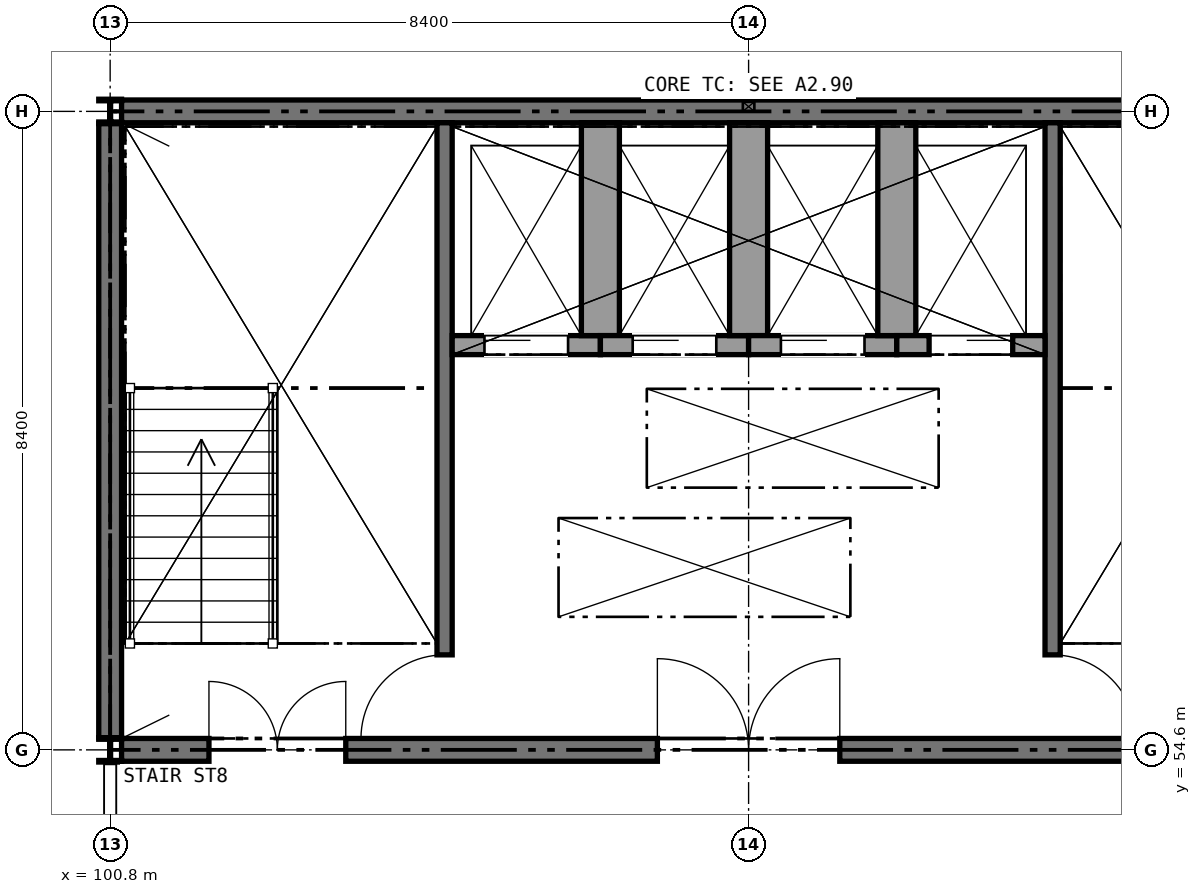
"""IFC4 building model, lengths in metres.
Left out: names, types, materials, properties, quantities, classifications, styles, units other than length and angle.
Written with IfcOpenShell. Run it as: python <this file> out.ifc"""

import sys

from ifc_helpers import new_model, si_unit, direction, frame, frame_2d, origin, origin_2d, place, context, subcontext, project, spatial, rectangle, hollow_rectangle, i_section, extrude, element, fill, save


model = new_model("IFC4")
c1 = context("Model", 3, precision=1e-05, world=origin(), true_north=direction((0.0, 1.0)))
c2 = subcontext(c1, "Body", "Model", "MODEL_VIEW")
j1 = project(units=[si_unit("LENGTHUNIT", "METRE"), si_unit("PLANEANGLEUNIT", "RADIAN")], contexts=[c1])
p1 = place(None, origin())
s1 = spatial("IfcSite", under=j1, at=p1, CompositionType="ELEMENT")
p2 = place(p1, origin())
s2 = spatial("IfcBuilding", under=s1, at=p2, CompositionType="ELEMENT")
p3 = place(p2, frame((0.0, 0.0, 67.6)))
s3 = spatial("IfcBuildingStorey", under=s2, at=p3, CompositionType="ELEMENT", Elevation=67.6)
p4 = place(p3, frame((100.95, 63.0, 0.0), z_axis=(0.0, 0.0, 1.0), x_axis=(1.0, 0.0, 0.0)))
e1 = element("IfcWall", 1, at=p4, inside=s3, PredefinedType="SHEAR", context=c2, shape_type="SweptSolid", body=[
    extrude(rectangle(XDim=16.49, YDim=0.3, at=frame_2d((8.245, 0.0))), origin(), (0.0, 0.0, 1.0), 4.2),
])
p5 = place(p3, frame((100.95, 54.6, 0.0), z_axis=(0.0, 0.0, 1.0), x_axis=(1.0, 0.0, 0.0)))
e2 = element("IfcWall", 2, at=p5, inside=s3, PredefinedType="SHEAR", context=c2, shape_type="SweptSolid", body=[
    extrude(rectangle(XDim=16.49, YDim=0.3, at=frame_2d((8.245, 0.0))), origin(), (0.0, 0.0, 1.0), 4.2),
])
p6 = place(p5, frame((1.15, 0.0, 0.0)))
e3 = element("IfcOpeningElement", 3, at=p6, cuts=e2, PredefinedType="OPENING", context=c2, shape_type="SweptSolid", body=[
    extrude(rectangle(XDim=1.8, YDim=2.1, at=frame_2d((0.9, 1.05))), frame((0.0, 0.16, 0.0), z_axis=(0.0, -1.0, 0.0), x_axis=(1.0, 0.0, 0.0)), (0.0, 0.0, 1.0), 0.32),
])
p7 = place(p5, frame((13.55, 0.0, 0.0)))
e4 = element("IfcOpeningElement", 4, at=p7, cuts=e2, PredefinedType="OPENING", context=c2, shape_type="SweptSolid", body=[
    extrude(rectangle(XDim=1.8, YDim=2.1, at=frame_2d((0.9, 1.05))), frame((0.0, 0.16, 0.0), z_axis=(0.0, -1.0, 0.0), x_axis=(1.0, 0.0, 0.0)), (0.0, 0.0, 1.0), 0.32),
])
p8 = place(p5, frame((7.05, 0.0, 0.0)))
e5 = element("IfcOpeningElement", 5, at=p8, cuts=e2, PredefinedType="OPENING", context=c2, shape_type="SweptSolid", body=[
    extrude(rectangle(XDim=2.4, YDim=2.4, at=frame_2d((1.2, 1.2))), frame((0.0, 0.16, 0.0), z_axis=(0.0, -1.0, 0.0), x_axis=(1.0, 0.0, 0.0)), (0.0, 0.0, 1.0), 0.32),
])
p9 = place(p3, frame((100.8, 54.76, 0.0), z_axis=(0.0, 0.0, 1.0), x_axis=(0.0, 1.0, 0.0)))
e6 = element("IfcWall", 6, at=p9, inside=s3, PredefinedType="SHEAR", context=c2, shape_type="SweptSolid", body=[
    extrude(rectangle(XDim=8.08, YDim=0.3, at=frame_2d((4.04, 0.0))), origin(), (0.0, 0.0, 1.0), 4.2),
])
for number, where, z_axis, x_axis in (
    (7, (100.8, 54.6, 0.0), (0.0, 0.0, 1.0), (1.0, 0.0, 0.0)),
    (8, (100.8, 63.0, 0.0), (0.0, 0.0, 1.0), (1.0, 0.0, 0.0)),
):
    element("IfcColumn", number, at=place(p3, frame(where, z_axis=z_axis, x_axis=x_axis)), inside=s3, PredefinedType="COLUMN", context=c2, shape_type="SweptSolid", body=[
        extrude(i_section(OverallWidth=0.3, OverallDepth=0.32, WebThickness=0.011, FlangeThickness=0.021, FilletRadius=0.027, at=origin_2d()), origin(), (0.0, 0.0, 1.0), 4.4),
    ])
p10 = place(p3, frame((100.8, 54.6, 4.4), z_axis=(0.0, 0.0, 1.0), x_axis=(1.0, 0.0, 0.0)))
e9 = element("IfcColumn", 9, at=p10, inside=s3, PredefinedType="COLUMN", context=c2, shape_type="SweptSolid", body=[
    extrude(hollow_rectangle(XDim=0.15, YDim=0.25, WallThickness=0.01, at=origin_2d()), origin(), (0.0, 0.0, 1.0), 3.0),
])
p11 = place(p3, frame((109.2, 54.6, 4.2), z_axis=(0.0, 0.0, 1.0), x_axis=(1.0, 0.0, 0.0)))
e10 = element("IfcColumn", 10, at=p11, inside=s3, PredefinedType="COLUMN", context=c2, shape_type="SweptSolid", body=[
    extrude(hollow_rectangle(XDim=0.15, YDim=0.25, WallThickness=0.01, at=origin_2d()), origin(), (0.0, 0.0, 1.0), 3.2),
])
p12 = place(p3, frame((100.8, 63.0, 4.4), z_axis=(0.0, 0.0, 1.0), x_axis=(1.0, 0.0, 0.0)))
e11 = element("IfcColumn", 11, at=p12, inside=s3, PredefinedType="COLUMN", context=c2, shape_type="SweptSolid", body=[
    extrude(hollow_rectangle(XDim=0.15, YDim=0.25, WallThickness=0.01, at=origin_2d()), origin(), (0.0, 0.0, 1.0), 3.0),
])
p13 = place(p3, frame((109.2, 63.0, 4.2), z_axis=(0.0, 0.0, 1.0), x_axis=(1.0, 0.0, 0.0)))
e12 = element("IfcColumn", 12, at=p13, inside=s3, PredefinedType="COLUMN", context=c2, shape_type="SweptSolid", body=[
    extrude(hollow_rectangle(XDim=0.15, YDim=0.25, WallThickness=0.01, at=origin_2d()), origin(), (0.0, 0.0, 1.0), 3.2),
])
p14 = place(p3, frame((100.8, 54.6, 4.4), z_axis=(0.0, 0.0, 1.0), x_axis=(0.0, 1.0, 0.0)))
e13 = element("IfcWall", 13, at=p14, inside=s3, PredefinedType="STANDARD", context=c2, shape_type="SweptSolid", body=[
    extrude(rectangle(XDim=8.4, YDim=0.3, at=frame_2d((4.2, 0.0))), origin(), (0.0, 0.0, 1.0), 3.0),
])
p15 = place(p3, frame((100.95, 54.6, 4.4), z_axis=(0.0, 0.0, 1.0), x_axis=(1.0, 0.0, 0.0)))
e14 = element("IfcWall", 14, at=p15, inside=s3, PredefinedType="STANDARD", context=c2, shape_type="SweptSolid", body=[
    extrude(rectangle(XDim=8.175, YDim=0.3, at=frame_2d((4.088, 0.0))), origin(), (0.0, 0.0, 1.0), 2.5),
])
p16 = place(p15, frame((1.5, 0.0, 0.0)))
e15 = element("IfcOpeningElement", 15, at=p16, cuts=e14, PredefinedType="OPENING", context=c2, shape_type="SweptSolid", body=[
    extrude(rectangle(XDim=1.1, YDim=2.1, at=frame_2d((0.55, 1.05))), frame((0.0, 0.16, 0.0), z_axis=(0.0, -1.0, 0.0), x_axis=(1.0, 0.0, 0.0)), (0.0, 0.0, 1.0), 0.32),
])
p17 = place(p15, frame((5.55, 0.0, 0.0)))
e16 = element("IfcOpeningElement", 16, at=p17, cuts=e14, PredefinedType="OPENING", context=c2, shape_type="SweptSolid", body=[
    extrude(rectangle(XDim=1.8, YDim=2.4, at=frame_2d((0.9, 1.2))), frame((0.0, 0.16, 0.0), z_axis=(0.0, -1.0, 0.0), x_axis=(1.0, 0.0, 0.0)), (0.0, 0.0, 1.0), 0.32),
])
p18 = place(p3, frame((109.275, 54.6, 4.4), z_axis=(0.0, 0.0, 1.0), x_axis=(1.0, 0.0, 0.0)))
e17 = element("IfcWall", 17, at=p18, inside=s3, PredefinedType="STANDARD", context=c2, shape_type="SweptSolid", body=[
    extrude(rectangle(XDim=8.175, YDim=0.3, at=frame_2d((4.087, 0.0))), origin(), (0.0, 0.0, 1.0), 2.5),
])
p19 = place(p18, frame((5.575, 0.0, 0.0)))
e18 = element("IfcOpeningElement", 18, at=p19, cuts=e17, PredefinedType="OPENING", context=c2, shape_type="SweptSolid", body=[
    extrude(rectangle(XDim=1.1, YDim=2.1, at=frame_2d((0.55, 1.05))), frame((0.0, 0.16, 0.0), z_axis=(0.0, -1.0, 0.0), x_axis=(1.0, 0.0, 0.0)), (0.0, 0.0, 1.0), 0.32),
])
p20 = place(p18, frame((0.825, 0.0, 0.0)))
e19 = element("IfcOpeningElement", 19, at=p20, cuts=e17, PredefinedType="OPENING", context=c2, shape_type="SweptSolid", body=[
    extrude(rectangle(XDim=1.8, YDim=2.4, at=frame_2d((0.9, 1.2))), frame((0.0, 0.16, 0.0), z_axis=(0.0, -1.0, 0.0), x_axis=(1.0, 0.0, 0.0)), (0.0, 0.0, 1.0), 0.32),
])
p21 = place(p3, frame((100.95, 63.0, 4.4), z_axis=(0.0, 0.0, 1.0), x_axis=(1.0, 0.0, 0.0)))
e20 = element("IfcWall", 20, at=p21, inside=s3, PredefinedType="STANDARD", context=c2, shape_type="SweptSolid", body=[
    extrude(rectangle(XDim=8.175, YDim=0.3, at=frame_2d((4.088, 0.0))), origin(), (0.0, 0.0, 1.0), 2.5),
])
p22 = place(p3, frame((109.275, 63.0, 4.4), z_axis=(0.0, 0.0, 1.0), x_axis=(1.0, 0.0, 0.0)))
e21 = element("IfcWall", 21, at=p22, inside=s3, PredefinedType="STANDARD", context=c2, shape_type="SweptSolid", body=[
    extrude(rectangle(XDim=8.175, YDim=0.3, at=frame_2d((4.087, 0.0))), origin(), (0.0, 0.0, 1.0), 2.5),
])
p23 = place(p3, frame((105.2, 62.85, 0.0), z_axis=(0.0, 0.0, 1.0), x_axis=(0.0, -1.0, 0.0)))
e22 = element("IfcWall", 22, at=p23, inside=s3, PredefinedType="SHEAR", context=c2, shape_type="SweptSolid", body=[
    extrude(rectangle(XDim=8.1, YDim=0.2, at=frame_2d((4.05, 0.0))), origin(), (0.0, 0.0, 1.0), 4.2),
])
p24 = place(p23, frame((7.0, 0.0, 0.0)))
e23 = element("IfcOpeningElement", 23, at=p24, cuts=e22, PredefinedType="OPENING", context=c2, shape_type="SweptSolid", body=[
    extrude(rectangle(XDim=1.11, YDim=2.1, at=frame_2d((0.555, 1.05))), frame((0.0, 0.11, 0.0), z_axis=(0.0, -1.0, 0.0), x_axis=(1.0, 0.0, 0.0)), (0.0, 0.0, 1.0), 0.22),
])
p25 = place(p3, frame((113.2, 62.85, 0.0), z_axis=(0.0, 0.0, 1.0), x_axis=(0.0, -1.0, 0.0)))
e24 = element("IfcWall", 24, at=p25, inside=s3, PredefinedType="SHEAR", context=c2, shape_type="SweptSolid", body=[
    extrude(rectangle(XDim=8.1, YDim=0.2, at=frame_2d((4.05, 0.0))), origin(), (0.0, 0.0, 1.0), 4.2),
])
p26 = place(p25, frame((7.0, 0.0, 0.0)))
e25 = element("IfcOpeningElement", 25, at=p26, cuts=e24, PredefinedType="OPENING", context=c2, shape_type="SweptSolid", body=[
    extrude(rectangle(XDim=1.11, YDim=2.1, at=frame_2d((0.555, 1.05))), frame((0.0, 0.11, 0.0), z_axis=(0.0, -1.0, 0.0), x_axis=(1.0, 0.0, 0.0)), (0.0, 0.0, 1.0), 0.22),
])
p27 = place(p3, frame((105.3, 59.925, 0.0), z_axis=(0.0, 0.0, 1.0), x_axis=(1.0, 0.0, 0.0)))
e26 = element("IfcWall", 26, at=p27, inside=s3, PredefinedType="SOLIDWALL", context=c2, shape_type="SweptSolid", body=[
    extrude(rectangle(XDim=1.95, YDim=0.25, at=frame_2d((0.975, 0.0))), origin(), (0.0, 0.0, 1.0), 7.4),
])
p28 = place(p27, frame((0.425, 0.0, 0.0)))
e27 = element("IfcOpeningElement", 27, at=p28, cuts=e26, PredefinedType="OPENING", context=c2, shape_type="SweptSolid", body=[
    extrude(rectangle(XDim=1.1, YDim=2.1, at=frame_2d((0.55, 1.05))), frame((0.0, 0.135, 0.0), z_axis=(0.0, -1.0, 0.0), x_axis=(1.0, 0.0, 0.0)), (0.0, 0.0, 1.0), 0.27),
])
p29 = place(p3, frame((107.25, 62.85, 0.0), z_axis=(0.0, 0.0, 1.0), x_axis=(0.0, -1.0, 0.0)))
e28 = element("IfcWall", 28, at=p29, inside=s3, PredefinedType="SOLIDWALL", context=c2, shape_type="SweptSolid", body=[
    extrude(rectangle(XDim=2.8, YDim=0.5, at=frame_2d((1.4, 0.0))), origin(), (0.0, 0.0, 1.0), 7.4),
])
p30 = place(p3, frame((107.25, 59.925, 0.0), z_axis=(0.0, 0.0, 1.0), x_axis=(1.0, 0.0, 0.0)))
e29 = element("IfcWall", 29, at=p30, inside=s3, PredefinedType="SOLIDWALL", context=c2, shape_type="SweptSolid", body=[
    extrude(rectangle(XDim=1.95, YDim=0.25, at=frame_2d((0.975, 0.0))), origin(), (0.0, 0.0, 1.0), 7.4),
])
p31 = place(p30, frame((0.425, 0.0, 0.0)))
e30 = element("IfcOpeningElement", 30, at=p31, cuts=e29, PredefinedType="OPENING", context=c2, shape_type="SweptSolid", body=[
    extrude(rectangle(XDim=1.1, YDim=2.1, at=frame_2d((0.55, 1.05))), frame((0.0, 0.135, 0.0), z_axis=(0.0, -1.0, 0.0), x_axis=(1.0, 0.0, 0.0)), (0.0, 0.0, 1.0), 0.27),
])
p32 = place(p3, frame((109.2, 62.85, 0.0), z_axis=(0.0, 0.0, 1.0), x_axis=(0.0, -1.0, 0.0)))
e31 = element("IfcWall", 31, at=p32, inside=s3, PredefinedType="SOLIDWALL", context=c2, shape_type="SweptSolid", body=[
    extrude(rectangle(XDim=2.8, YDim=0.5, at=frame_2d((1.4, 0.0))), origin(), (0.0, 0.0, 1.0), 7.4),
])
p33 = place(p3, frame((109.2, 59.925, 0.0), z_axis=(0.0, 0.0, 1.0), x_axis=(1.0, 0.0, 0.0)))
e32 = element("IfcWall", 32, at=p33, inside=s3, PredefinedType="SOLIDWALL", context=c2, shape_type="SweptSolid", body=[
    extrude(rectangle(XDim=1.95, YDim=0.25, at=frame_2d((0.975, 0.0))), origin(), (0.0, 0.0, 1.0), 7.4),
])
p34 = place(p33, frame((0.425, 0.0, 0.0)))
e33 = element("IfcOpeningElement", 33, at=p34, cuts=e32, PredefinedType="OPENING", context=c2, shape_type="SweptSolid", body=[
    extrude(rectangle(XDim=1.1, YDim=2.1, at=frame_2d((0.55, 1.05))), frame((0.0, 0.135, 0.0), z_axis=(0.0, -1.0, 0.0), x_axis=(1.0, 0.0, 0.0)), (0.0, 0.0, 1.0), 0.27),
])
p35 = place(p3, frame((111.15, 62.85, 0.0), z_axis=(0.0, 0.0, 1.0), x_axis=(0.0, -1.0, 0.0)))
e34 = element("IfcWall", 34, at=p35, inside=s3, PredefinedType="SOLIDWALL", context=c2, shape_type="SweptSolid", body=[
    extrude(rectangle(XDim=2.8, YDim=0.5, at=frame_2d((1.4, 0.0))), origin(), (0.0, 0.0, 1.0), 7.4),
])
p36 = place(p3, frame((111.15, 59.925, 0.0), z_axis=(0.0, 0.0, 1.0), x_axis=(1.0, 0.0, 0.0)))
e35 = element("IfcWall", 35, at=p36, inside=s3, PredefinedType="SOLIDWALL", context=c2, shape_type="SweptSolid", body=[
    extrude(rectangle(XDim=1.95, YDim=0.25, at=frame_2d((0.975, 0.0))), origin(), (0.0, 0.0, 1.0), 7.4),
])
p37 = place(p36, frame((0.425, 0.0, 0.0)))
e36 = element("IfcOpeningElement", 36, at=p37, cuts=e35, PredefinedType="OPENING", context=c2, shape_type="SweptSolid", body=[
    extrude(rectangle(XDim=1.1, YDim=2.1, at=frame_2d((0.55, 1.05))), frame((0.0, 0.135, 0.0), z_axis=(0.0, -1.0, 0.0), x_axis=(1.0, 0.0, 0.0)), (0.0, 0.0, 1.0), 0.27),
])
for number, where, z_axis, x_axis in (
    (37, (105.2, 62.85, 4.4), (0.0, 0.0, 1.0), (0.0, -1.0, 0.0)),
    (38, (113.2, 62.85, 4.4), (0.0, 0.0, 1.0), (0.0, -1.0, 0.0)),
):
    element("IfcWall", number, at=place(p3, frame(where, z_axis=z_axis, x_axis=x_axis)), inside=s3, PredefinedType="PARTITIONING", context=c2, shape_type="SweptSolid", body=[
        extrude(rectangle(XDim=8.1, YDim=0.2, at=frame_2d((4.05, 0.0))), origin(), (0.0, 0.0, 1.0), 2.6),
    ])
p38 = place(p3, frame((110.539, 56.255, 7.6), z_axis=(0.0, 0.0, 1.0), x_axis=(-1.0, 0.0, 0.0)))
e39 = element("IfcWall", 39, at=p38, inside=s3, PredefinedType="PARAPET", context=c2, shape_type="SweptSolid", body=[
    extrude(rectangle(XDim=3.86, YDim=0.15, at=frame_2d((1.93, 0.0))), origin(), (0.0, 0.0, 1.0), 1.1),
])
p39 = place(p3, frame((106.604, 56.18, 7.6), z_axis=(0.0, 0.0, 1.0), x_axis=(0.0, 1.0, 0.0)))
e40 = element("IfcWall", 40, at=p39, inside=s3, PredefinedType="PARAPET", context=c2, shape_type="SweptSolid", body=[
    extrude(rectangle(XDim=1.64, YDim=0.15, at=frame_2d((0.82, 0.0))), origin(), (0.0, 0.0, 1.0), 1.1),
])
for number, where, z_axis, x_axis in (
    (41, (106.679, 57.745, 7.6), (0.0, 0.0, 1.0), (1.0, 0.0, 0.0)),
    (42, (107.861, 57.955, 7.6), (0.0, 0.0, 1.0), (1.0, 0.0, 0.0)),
):
    element("IfcWall", number, at=place(p3, frame(where, z_axis=z_axis, x_axis=x_axis)), inside=s3, PredefinedType="PARAPET", context=c2, shape_type="SweptSolid", body=[
        extrude(rectangle(XDim=3.86, YDim=0.15, at=frame_2d((1.93, 0.0))), origin(), (0.0, 0.0, 1.0), 1.1),
    ])
p40 = place(p3, frame((111.795, 57.88, 7.6), z_axis=(0.0, 0.0, 1.0), x_axis=(0.0, 1.0, 0.0)))
e43 = element("IfcWall", 43, at=p40, inside=s3, PredefinedType="PARAPET", context=c2, shape_type="SweptSolid", body=[
    extrude(rectangle(XDim=1.64, YDim=0.15, at=frame_2d((0.82, 0.0))), origin(), (0.0, 0.0, 1.0), 1.1),
])
p41 = place(p3, frame((111.72, 59.445, 7.6), z_axis=(0.0, 0.0, 1.0), x_axis=(-1.0, 0.0, 0.0)))
e44 = element("IfcWall", 44, at=p41, inside=s3, PredefinedType="PARAPET", context=c2, shape_type="SweptSolid", body=[
    extrude(rectangle(XDim=3.86, YDim=0.15, at=frame_2d((1.93, 0.0))), origin(), (0.0, 0.0, 1.0), 1.1),
])
p42 = place(p16, origin())
e45 = element("IfcDoor", 45, at=p42, inside=s3, OperationType="SINGLE_SWING_LEFT", PredefinedType="DOOR", context=c2, shape_type="SweptSolid", body=[
    extrude(rectangle(XDim=1.1, YDim=2.1, at=frame_2d((0.55, 1.05))), frame((0.0, 0.025, 0.0), z_axis=(0.0, -1.0, 0.0), x_axis=(1.0, 0.0, 0.0)), (0.0, 0.0, 1.0), 0.05),
])
fill(e15, e45)
p43 = place(p17, frame((1.8, 0.0, 0.0), z_axis=(0.0, 0.0, 1.0), x_axis=(-1.0, 0.0, 0.0)))
e46 = element("IfcDoor", 46, at=p43, inside=s3, OperationType="DOUBLE_DOOR_SINGLE_SWING", PredefinedType="DOOR", context=c2, shape_type="SweptSolid", body=[
    extrude(rectangle(XDim=1.8, YDim=2.4, at=frame_2d((0.9, 1.2))), frame((0.0, 0.025, 0.0), z_axis=(0.0, -1.0, 0.0), x_axis=(1.0, 0.0, 0.0)), (0.0, 0.0, 1.0), 0.05),
])
fill(e16, e46)
p44 = place(p20, frame((1.8, 0.0, 0.0), z_axis=(0.0, 0.0, 1.0), x_axis=(-1.0, 0.0, 0.0)))
e47 = element("IfcDoor", 47, at=p44, inside=s3, OperationType="DOUBLE_DOOR_SINGLE_SWING", PredefinedType="DOOR", context=c2, shape_type="SweptSolid", body=[
    extrude(rectangle(XDim=1.8, YDim=2.4, at=frame_2d((0.9, 1.2))), frame((0.0, 0.025, 0.0), z_axis=(0.0, -1.0, 0.0), x_axis=(1.0, 0.0, 0.0)), (0.0, 0.0, 1.0), 0.05),
])
fill(e19, e47)
p45 = place(p24, frame((1.1, 0.0, 0.0), z_axis=(0.0, 0.0, 1.0), x_axis=(-1.0, 0.0, 0.0)))
e48 = element("IfcDoor", 48, at=p45, inside=s3, OperationType="SINGLE_SWING_LEFT", PredefinedType="DOOR", context=c2, shape_type="SweptSolid", body=[
    extrude(rectangle(XDim=1.1, YDim=2.1, at=frame_2d((0.55, 1.05))), frame((0.0, 0.025, 0.0), z_axis=(0.0, -1.0, 0.0), x_axis=(1.0, 0.0, 0.0)), (0.0, 0.0, 1.0), 0.05),
])
fill(e23, e48)
p46 = place(p26, origin())
e49 = element("IfcDoor", 49, at=p46, inside=s3, OperationType="SINGLE_SWING_RIGHT", PredefinedType="DOOR", context=c2, shape_type="SweptSolid", body=[
    extrude(rectangle(XDim=1.1, YDim=2.1, at=frame_2d((0.55, 1.05))), frame((0.0, 0.025, 0.0), z_axis=(0.0, -1.0, 0.0), x_axis=(1.0, 0.0, 0.0)), (0.0, 0.0, 1.0), 0.05),
])
fill(e25, e49)
p47 = place(p28, frame((1.1, 0.0, 0.0), z_axis=(0.0, 0.0, 1.0), x_axis=(-1.0, 0.0, 0.0)))
e50 = element("IfcDoor", 50, at=p47, inside=s3, OperationType="SLIDING_TO_RIGHT", PredefinedType="DOOR", context=c2, shape_type="SweptSolid", body=[
    extrude(rectangle(XDim=1.1, YDim=2.1, at=frame_2d((0.55, 1.05))), frame((0.0, 0.025, 0.0), z_axis=(0.0, -1.0, 0.0), x_axis=(1.0, 0.0, 0.0)), (0.0, 0.0, 1.0), 0.05),
])
fill(e27, e50)
p48 = place(p31, frame((1.1, 0.0, 0.0), z_axis=(0.0, 0.0, 1.0), x_axis=(-1.0, 0.0, 0.0)))
e51 = element("IfcDoor", 51, at=p48, inside=s3, OperationType="SLIDING_TO_RIGHT", PredefinedType="DOOR", context=c2, shape_type="SweptSolid", body=[
    extrude(rectangle(XDim=1.1, YDim=2.1, at=frame_2d((0.55, 1.05))), frame((0.0, 0.025, 0.0), z_axis=(0.0, -1.0, 0.0), x_axis=(1.0, 0.0, 0.0)), (0.0, 0.0, 1.0), 0.05),
])
fill(e30, e51)
p49 = place(p34, frame((1.1, 0.0, 0.0), z_axis=(0.0, 0.0, 1.0), x_axis=(-1.0, 0.0, 0.0)))
e52 = element("IfcDoor", 52, at=p49, inside=s3, OperationType="SLIDING_TO_RIGHT", PredefinedType="DOOR", context=c2, shape_type="SweptSolid", body=[
    extrude(rectangle(XDim=1.1, YDim=2.1, at=frame_2d((0.55, 1.05))), frame((0.0, 0.025, 0.0), z_axis=(0.0, -1.0, 0.0), x_axis=(1.0, 0.0, 0.0)), (0.0, 0.0, 1.0), 0.05),
])
fill(e33, e52)
p50 = place(p37, frame((1.1, 0.0, 0.0), z_axis=(0.0, 0.0, 1.0), x_axis=(-1.0, 0.0, 0.0)))
e53 = element("IfcDoor", 53, at=p50, inside=s3, OperationType="SLIDING_TO_LEFT", PredefinedType="DOOR", context=c2, shape_type="SweptSolid", body=[
    extrude(rectangle(XDim=1.1, YDim=2.1, at=frame_2d((0.55, 1.05))), frame((0.0, 0.025, 0.0), z_axis=(0.0, -1.0, 0.0), x_axis=(1.0, 0.0, 0.0)), (0.0, 0.0, 1.0), 0.05),
])
fill(e36, e53)
p51 = place(p6, origin())
e54 = element("IfcDoor", 54, at=p51, inside=s3, OperationType="DOUBLE_DOOR_SINGLE_SWING", PredefinedType="DOOR", context=c2, shape_type="SweptSolid", body=[
    extrude(rectangle(XDim=1.8, YDim=2.1, at=frame_2d((0.9, 1.05))), frame((0.0, 0.025, 0.0), z_axis=(0.0, -1.0, 0.0), x_axis=(1.0, 0.0, 0.0)), (0.0, 0.0, 1.0), 0.05),
])
fill(e3, e54)
p52 = place(p8, origin())
e55 = element("IfcDoor", 55, at=p52, inside=s3, OperationType="DOUBLE_DOOR_SINGLE_SWING", PredefinedType="DOOR", context=c2, shape_type="SweptSolid", body=[
    extrude(rectangle(XDim=2.4, YDim=2.4, at=frame_2d((1.2, 1.2))), frame((0.0, 0.025, 0.0), z_axis=(0.0, -1.0, 0.0), x_axis=(1.0, 0.0, 0.0)), (0.0, 0.0, 1.0), 0.05),
])
fill(e5, e55)
save(model, sys.argv[1])
